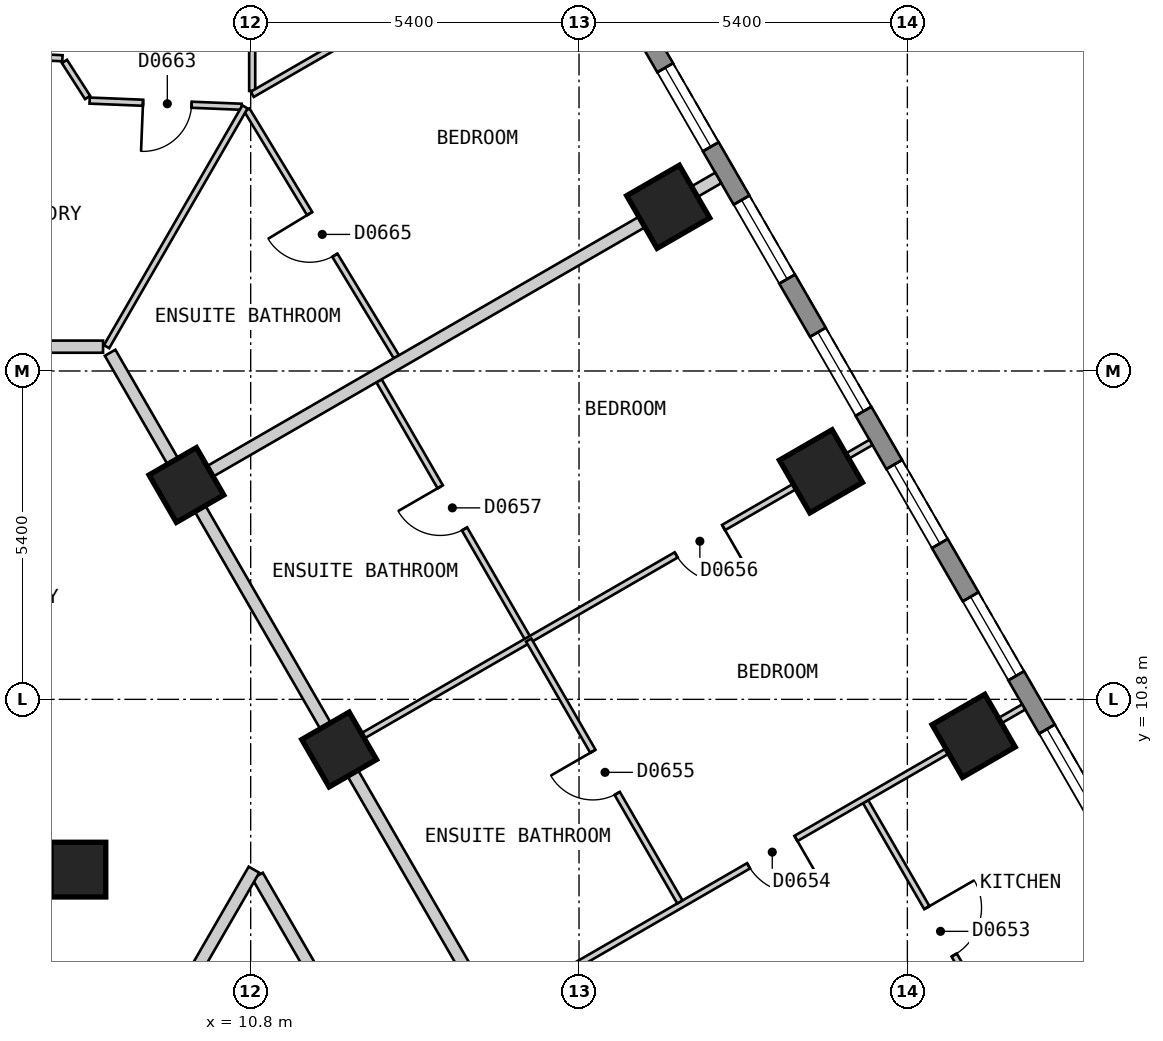
"""IFC4 building model, lengths in metres.
Left out: names, types, materials, properties, quantities, classifications, styles, units other than length and angle.
Written with IfcOpenShell. Run it as: python <this file> out.ifc"""

import sys

from ifc_helpers import new_model, si_unit, direction, frame, frame_2d, origin, origin_2d, place, context, subcontext, project, spatial, polyline, rectangle, outline, extrude, element, fill, save


model = new_model("IFC4")
c1 = context("Model", 3, precision=1e-05, world=origin(), true_north=direction((0.0, 1.0)))
c2 = subcontext(c1, "Body", "Model", "MODEL_VIEW")
j1 = project(units=[si_unit("LENGTHUNIT", "METRE"), si_unit("PLANEANGLEUNIT", "RADIAN")], contexts=[c1])
p1 = place(None, origin())
s1 = spatial("IfcSite", under=j1, at=p1, CompositionType="ELEMENT")
p2 = place(p1, origin())
s2 = spatial("IfcBuilding", under=s1, at=p2, CompositionType="ELEMENT")
p3 = place(p2, frame((0.0, 0.0, 81.0)))
s3 = spatial("IfcBuildingStorey", under=s2, at=p3, CompositionType="ELEMENT", Elevation=81.0)
for number, where, z_axis, x_axis in (
    (1, (22.69, 10.2, 0.0), (0.0, 0.0, 1.0), (-0.5, 0.866, 0.0)),
    (2, (20.179, 14.55, 0.0), (0.0, 0.0, 1.0), (-0.5, 0.866, 0.0)),
    (3, (17.667, 18.9, 0.0), (0.0, 0.0, 1.0), (-0.5, 0.866, 0.0)),
):
    element("IfcColumn", number, at=place(p3, frame(where, z_axis=z_axis, x_axis=x_axis)), inside=s3, PredefinedType="COLUMN", context=c2, shape_type="SweptSolid", body=[
        extrude(rectangle(XDim=1.0, YDim=1.0, at=origin_2d()), origin(), (0.0, 0.0, 1.0), 3.0),
    ])
for number, where, z_axis, x_axis in (
    (4, (12.255, 9.975, 0.0), (0.0, 0.0, 1.0), (-0.5, 0.866, 0.0)),
    (5, (7.967, 8.0, 0.0), (0.0, 0.0, 1.0), (1.0, 0.0, 0.0)),
    (6, (9.743, 14.325, 0.0), (0.0, 0.0, 1.0), (-0.5, 0.866, 0.0)),
):
    element("IfcColumn", number, at=place(p3, frame(where, z_axis=z_axis, x_axis=x_axis)), inside=s3, PredefinedType="COLUMN", context=c2, shape_type="SweptSolid", body=[
        extrude(rectangle(XDim=0.9, YDim=0.9, at=origin_2d()), origin(), (0.0, 0.0, 1.0), 3.0),
    ])
p4 = place(p3, frame((29.027, 1.425, 0.0), z_axis=(0.0, 0.0, 1.0), x_axis=(-0.500027479704, 0.866009537788, 0.0)))
e7 = element("IfcWall", 7, at=p4, inside=s3, PredefinedType="SOLIDWALL", context=c2, shape_type="SweptSolid", body=[
    extrude(outline(polyline([(0.0, -0.15), (26.559, -0.15), (26.478, 0.15), (0.08, 0.15), (0.0, -0.15)])), origin(), (0.0, 0.0, 1.0), 2.7),
])
p5 = place(p4, frame((1.227, 0.0, 0.15)))
e8 = element("IfcOpeningElement", 8, at=p5, cuts=e7, PredefinedType="OPENING", context=c2, shape_type="SweptSolid", body=[
    extrude(rectangle(XDim=1.5, YDim=2.1, at=frame_2d((0.75, 1.05))), frame((0.0, 0.16, 0.0), z_axis=(0.0, -1.0, 0.0), x_axis=(1.0, 0.0, 0.0)), (0.0, 0.0, 1.0), 0.32),
])
p6 = place(p4, frame((3.738, 0.0, 0.15)))
e9 = element("IfcOpeningElement", 9, at=p6, cuts=e7, PredefinedType="OPENING", context=c2, shape_type="SweptSolid", body=[
    extrude(rectangle(XDim=1.5, YDim=2.1, at=frame_2d((0.75, 1.05))), frame((0.0, 0.16, 0.0), z_axis=(0.0, -1.0, 0.0), x_axis=(1.0, 0.0, 0.0)), (0.0, 0.0, 1.0), 0.32),
])
p7 = place(p4, frame((6.25, 0.0, 0.15)))
e10 = element("IfcOpeningElement", 10, at=p7, cuts=e7, PredefinedType="OPENING", context=c2, shape_type="SweptSolid", body=[
    extrude(rectangle(XDim=1.5, YDim=2.1, at=frame_2d((0.75, 1.05))), frame((0.0, 0.16, 0.0), z_axis=(0.0, -1.0, 0.0), x_axis=(1.0, 0.0, 0.0)), (0.0, 0.0, 1.0), 0.32),
])
p8 = place(p4, frame((8.761, 0.0, 0.15)))
e11 = element("IfcOpeningElement", 11, at=p8, cuts=e7, PredefinedType="OPENING", context=c2, shape_type="SweptSolid", body=[
    extrude(rectangle(XDim=1.5, YDim=2.1, at=frame_2d((0.75, 1.05))), frame((0.0, 0.16, 0.0), z_axis=(0.0, -1.0, 0.0), x_axis=(1.0, 0.0, 0.0)), (0.0, 0.0, 1.0), 0.32),
])
p9 = place(p4, frame((11.273, 0.0, 0.15)))
e12 = element("IfcOpeningElement", 12, at=p9, cuts=e7, PredefinedType="OPENING", context=c2, shape_type="SweptSolid", body=[
    extrude(rectangle(XDim=1.5, YDim=2.1, at=frame_2d((0.75, 1.05))), frame((0.0, 0.16, 0.0), z_axis=(0.0, -1.0, 0.0), x_axis=(1.0, 0.0, 0.0)), (0.0, 0.0, 1.0), 0.32),
])
p10 = place(p4, frame((13.785, 0.0, 0.15)))
e13 = element("IfcOpeningElement", 13, at=p10, cuts=e7, PredefinedType="OPENING", context=c2, shape_type="SweptSolid", body=[
    extrude(rectangle(XDim=1.5, YDim=2.1, at=frame_2d((0.75, 1.05))), frame((0.0, 0.16, 0.0), z_axis=(0.0, -1.0, 0.0), x_axis=(1.0, 0.0, 0.0)), (0.0, 0.0, 1.0), 0.32),
])
p11 = place(p4, frame((16.296, 0.0, 0.15)))
e14 = element("IfcOpeningElement", 14, at=p11, cuts=e7, PredefinedType="OPENING", context=c2, shape_type="SweptSolid", body=[
    extrude(rectangle(XDim=1.5, YDim=2.1, at=frame_2d((0.75, 1.05))), frame((0.0, 0.16, 0.0), z_axis=(0.0, -1.0, 0.0), x_axis=(1.0, 0.0, 0.0)), (0.0, 0.0, 1.0), 0.32),
])
p12 = place(p4, frame((18.807, 0.0, 0.15)))
e15 = element("IfcOpeningElement", 15, at=p12, cuts=e7, PredefinedType="OPENING", context=c2, shape_type="SweptSolid", body=[
    extrude(rectangle(XDim=1.5, YDim=2.1, at=frame_2d((0.75, 1.05))), frame((0.0, 0.16, 0.0), z_axis=(0.0, -1.0, 0.0), x_axis=(1.0, 0.0, 0.0)), (0.0, 0.0, 1.0), 0.32),
])
p13 = place(p4, frame((21.319, 0.0, 0.15)))
e16 = element("IfcOpeningElement", 16, at=p13, cuts=e7, PredefinedType="OPENING", context=c2, shape_type="SweptSolid", body=[
    extrude(rectangle(XDim=1.5, YDim=2.1, at=frame_2d((0.75, 1.05))), frame((0.0, 0.16, 0.0), z_axis=(0.0, -1.0, 0.0), x_axis=(1.0, 0.0, 0.0)), (0.0, 0.0, 1.0), 0.32),
])
p14 = place(p4, frame((23.831, 0.0, 0.15)))
e17 = element("IfcOpeningElement", 17, at=p14, cuts=e7, PredefinedType="OPENING", context=c2, shape_type="SweptSolid", body=[
    extrude(rectangle(XDim=1.5, YDim=2.1, at=frame_2d((0.75, 1.05))), frame((0.0, 0.16, 0.0), z_axis=(0.0, -1.0, 0.0), x_axis=(1.0, 0.0, 0.0)), (0.0, 0.0, 1.0), 0.32),
])
p15 = place(p3, frame((10.913, 7.899, 0.0), z_axis=(0.0, 0.0, 1.0), x_axis=(0.500028940566, -0.866008694296, 0.0)))
e18 = element("IfcWall", 18, at=p15, inside=s3, PredefinedType="PARTITIONING", context=c2, shape_type="SweptSolid", body=[
    extrude(rectangle(XDim=10.159, YDim=0.2, at=frame_2d((5.08, 0.0))), origin(), (0.0, 0.0, 1.0), 2.7),
])
p16 = place(p15, frame((4.63, 0.0, 0.0)))
e19 = element("IfcOpeningElement", 19, at=p16, cuts=e18, PredefinedType="OPENING", context=c2, shape_type="SweptSolid", body=[
    extrude(rectangle(XDim=0.9, YDim=2.1, at=frame_2d((0.45, 1.05))), frame((0.0, 0.11, 0.0), z_axis=(0.0, -1.0, 0.0), x_axis=(1.0, 0.0, 0.0)), (0.0, 0.0, 1.0), 0.22),
])
p17 = place(p3, frame((8.488, 16.5, 0.0), z_axis=(0.0, 0.0, 1.0), x_axis=(0.499986836607, -0.86603300354, 0.0)))
e20 = element("IfcWall", 20, at=p17, inside=s3, PredefinedType="PARTITIONING", context=c2, shape_type="SweptSolid", body=[
    extrude(rectangle(XDim=20.09, YDim=0.2, at=frame_2d((10.045, 0.0))), origin(), (0.0, 0.0, 1.0), 2.7),
])
p18 = place(p17, frame((14.569, 0.0, 0.0)))
e21 = element("IfcOpeningElement", 21, at=p18, cuts=e20, PredefinedType="OPENING", context=c2, shape_type="SweptSolid", body=[
    extrude(rectangle(XDim=1.0, YDim=2.1, at=frame_2d((0.5, 1.05))), frame((0.0, 0.11, 0.0), z_axis=(0.0, -1.0, 0.0), x_axis=(1.0, 0.0, 0.0)), (0.0, 0.0, 1.0), 0.22),
])
p19 = place(p3, frame((5.889, 16.6, 0.0), z_axis=(0.0, 0.0, 1.0), x_axis=(1.0, 0.0, 0.0)))
e22 = element("IfcWall", 22, at=p19, inside=s3, PredefinedType="PARTITIONING", context=c2, shape_type="SweptSolid", body=[
    extrude(rectangle(XDim=2.483, YDim=0.2, at=frame_2d((1.242, 0.0))), origin(), (0.0, 0.0, 1.0), 2.7),
])
p20 = place(p3, frame((6.928, 1.2, 0.0), z_axis=(0.0, 0.0, 1.0), x_axis=(0.500055327065, 0.865993458332, 0.0)))
e23 = element("IfcWall", 23, at=p20, inside=s3, PredefinedType="PARTITIONING", context=c2, shape_type="SweptSolid", body=[
    extrude(rectangle(XDim=7.851, YDim=0.2, at=frame_2d((3.926, 0.0))), origin(), (0.0, 0.0, 1.0), 2.7),
])
p21 = place(p3, frame((7.737, 21.291, 0.0), z_axis=(0.0, 0.0, 1.0), x_axis=(0.540389876456, -0.841414749944, 0.0)))
e24 = element("IfcWall", 24, at=p21, inside=s3, PredefinedType="PARTITIONING", context=c2, shape_type="SweptSolid", body=[
    extrude(rectangle(XDim=0.705, YDim=0.1, at=frame_2d((0.353, 0.0))), origin(), (0.0, 0.0, 1.0), 2.7),
])
p22 = place(p3, frame((10.738, 20.492, 0.0), z_axis=(0.0, 0.0, 1.0), x_axis=(0.518100976056, -0.855319459974, 0.0)))
e25 = element("IfcWall", 25, at=p22, inside=s3, PredefinedType="PARTITIONING", context=c2, shape_type="SweptSolid", body=[
    extrude(rectangle(XDim=4.744, YDim=0.1, at=frame_2d((2.372, 0.0))), origin(), (0.0, 0.0, 1.0), 2.7),
])
p23 = place(p22, frame((1.992, 0.0, 0.0)))
e26 = element("IfcOpeningElement", 26, at=p23, cuts=e25, PredefinedType="OPENING", context=c2, shape_type="SweptSolid", body=[
    extrude(rectangle(XDim=0.8, YDim=2.1, at=frame_2d((0.4, 1.05))), frame((0.0, 0.06, 0.0), z_axis=(0.0, -1.0, 0.0), x_axis=(1.0, 0.0, 0.0)), (0.0, 0.0, 1.0), 0.12),
])
p24 = place(p3, frame((12.911, 16.038, 0.0), z_axis=(0.0, 0.0, 1.0), x_axis=(0.499974319101, -0.866040230151, 0.0)))
e27 = element("IfcWall", 27, at=p24, inside=s3, PredefinedType="PARTITIONING", context=c2, shape_type="SweptSolid", body=[
    extrude(rectangle(XDim=4.923, YDim=0.1, at=frame_2d((2.461, 0.0))), origin(), (0.0, 0.0, 1.0), 2.7),
])
p25 = place(p24, frame((2.012, 0.0, 0.0)))
e28 = element("IfcOpeningElement", 28, at=p25, cuts=e27, PredefinedType="OPENING", context=c2, shape_type="SweptSolid", body=[
    extrude(rectangle(XDim=0.8, YDim=2.1, at=frame_2d((0.4, 1.05))), frame((0.0, 0.06, 0.0), z_axis=(0.0, -1.0, 0.0), x_axis=(1.0, 0.0, 0.0)), (0.0, 0.0, 1.0), 0.12),
])
p26 = place(p3, frame((20.914, 9.117, 0.0), z_axis=(0.0, 0.0, 1.0), x_axis=(0.500007182864, -0.866021256716, 0.0)))
e29 = element("IfcWall", 29, at=p26, inside=s3, PredefinedType="PARTITIONING", context=c2, shape_type="SweptSolid", body=[
    extrude(rectangle(XDim=4.874, YDim=0.1, at=frame_2d((2.437, 0.0))), origin(), (0.0, 0.0, 1.0), 2.7),
])
p27 = place(p26, frame((2.012, 0.0, 0.0)))
e30 = element("IfcOpeningElement", 30, at=p27, cuts=e29, PredefinedType="OPENING", context=c2, shape_type="SweptSolid", body=[
    extrude(rectangle(XDim=0.9, YDim=2.1, at=frame_2d((0.45, 1.05))), frame((0.0, 0.06, 0.0), z_axis=(0.0, -1.0, 0.0), x_axis=(1.0, 0.0, 0.0)), (0.0, 0.0, 1.0), 0.12),
])
p28 = place(p3, frame((8.151, 20.647, 0.0), z_axis=(0.0, 0.0, 1.0), x_axis=(0.999167241152, -0.040802257405, 0.0)))
e31 = element("IfcWall", 31, at=p28, inside=s3, PredefinedType="PARTITIONING", context=c2, shape_type="SweptSolid", body=[
    extrude(rectangle(XDim=2.501, YDim=0.1, at=frame_2d((1.25, 0.0))), origin(), (0.0, 0.0, 1.0), 2.7),
])
p29 = place(p28, frame((0.879, 0.0, 0.0)))
e32 = element("IfcOpeningElement", 32, at=p29, cuts=e31, PredefinedType="OPENING", context=c2, shape_type="SweptSolid", body=[
    extrude(rectangle(XDim=0.8, YDim=2.1, at=frame_2d((0.4, 1.05))), frame((0.0, 0.06, 0.0), z_axis=(0.0, -1.0, 0.0), x_axis=(1.0, 0.0, 0.0)), (0.0, 0.0, 1.0), 0.12),
])
p30 = place(p3, frame((5.649, 21.441, 0.0), z_axis=(0.0, 0.0, 1.0), x_axis=(0.998867332207, -0.047582062273, 0.0)))
e33 = element("IfcWall", 33, at=p30, inside=s3, PredefinedType="PARTITIONING", context=c2, shape_type="SweptSolid", body=[
    extrude(rectangle(XDim=2.058, YDim=0.1, at=frame_2d((1.029, 0.0))), origin(), (0.0, 0.0, 1.0), 2.7),
])
p31 = place(p3, frame((8.43, 16.6, 0.0), z_axis=(0.0, 0.0, 1.0), x_axis=(0.499951460778, 0.866053426104, 0.0)))
e34 = element("IfcWall", 34, at=p31, inside=s3, PredefinedType="PARTITIONING", context=c2, shape_type="SweptSolid", body=[
    extrude(rectangle(XDim=4.553, YDim=0.1, at=frame_2d((2.276, 0.0))), origin(), (0.0, 0.0, 1.0), 2.7),
])
p32 = place(p3, frame((10.825, 20.806, 0.0), z_axis=(0.0, 0.0, 1.0), x_axis=(0.0, 1.0, 0.0)))
e35 = element("IfcWall", 35, at=p32, inside=s3, PredefinedType="PARTITIONING", context=c2, shape_type="SweptSolid", body=[
    extrude(rectangle(XDim=5.894, YDim=0.1, at=frame_2d((2.947, 0.0))), origin(), (0.0, 0.0, 1.0), 2.7),
])
p33 = place(p32, frame((2.468, 0.0, 0.0)))
e36 = element("IfcOpeningElement", 36, at=p33, cuts=e35, PredefinedType="OPENING", context=c2, shape_type="SweptSolid", body=[
    extrude(rectangle(XDim=0.9, YDim=2.1, at=frame_2d((0.45, 1.05))), frame((0.0, 0.06, 0.0), z_axis=(0.0, -1.0, 0.0), x_axis=(1.0, 0.0, 0.0)), (0.0, 0.0, 1.0), 0.12),
])
p34 = place(p3, frame((14.853, 5.675, 0.0), z_axis=(0.0, 0.0, 1.0), x_axis=(0.866016855193, 0.500014806302, 0.0)))
e37 = element("IfcWall", 37, at=p34, inside=s3, PredefinedType="PARTITIONING", context=c2, shape_type="SweptSolid", body=[
    extrude(rectangle(XDim=10.0, YDim=0.1, at=frame_2d((5.0, 0.0))), origin(), (0.0, 0.0, 1.0), 2.7),
])
p35 = place(p34, frame((4.775, 0.0, 0.0)))
e38 = element("IfcOpeningElement", 38, at=p35, cuts=e37, PredefinedType="OPENING", context=c2, shape_type="SweptSolid", body=[
    extrude(rectangle(XDim=0.9, YDim=2.1, at=frame_2d((0.45, 1.05))), frame((0.0, 0.06, 0.0), z_axis=(0.0, -1.0, 0.0), x_axis=(1.0, 0.0, 0.0)), (0.0, 0.0, 1.0), 0.12),
])
p36 = place(p3, frame((10.826, 20.75, 0.0), z_axis=(0.0, 0.0, 1.0), x_axis=(0.865986712877, 0.50006700863, 0.0)))
e39 = element("IfcWall", 39, at=p36, inside=s3, PredefinedType="PARTITIONING", context=c2, shape_type="SweptSolid", body=[
    extrude(rectangle(XDim=5.949, YDim=0.1, at=frame_2d((2.975, 0.0))), origin(), (0.0, 0.0, 1.0), 2.7),
])
p37 = place(p36, frame((2.524, 0.0, 0.0)))
e40 = element("IfcOpeningElement", 40, at=p37, cuts=e39, PredefinedType="OPENING", context=c2, shape_type="SweptSolid", body=[
    extrude(rectangle(XDim=0.9, YDim=2.1, at=frame_2d((0.45, 1.05))), frame((0.0, 0.06, 0.0), z_axis=(0.0, -1.0, 0.0), x_axis=(1.0, 0.0, 0.0)), (0.0, 0.0, 1.0), 0.12),
])
p38 = place(p3, frame((12.342, 10.025, 0.0), z_axis=(0.0, 0.0, 1.0), x_axis=(0.865992435864, 0.500057097767, 0.0)))
e41 = element("IfcWall", 41, at=p38, inside=s3, PredefinedType="PARTITIONING", context=c2, shape_type="SweptSolid", body=[
    extrude(rectangle(XDim=9.999, YDim=0.1, at=frame_2d((5.0, 0.0))), origin(), (0.0, 0.0, 1.0), 2.7),
])
p39 = place(p38, frame((6.3, 0.0, 0.0)))
e42 = element("IfcOpeningElement", 42, at=p39, cuts=e41, PredefinedType="OPENING", context=c2, shape_type="SweptSolid", body=[
    extrude(rectangle(XDim=0.9, YDim=2.1, at=frame_2d((0.45, 1.05))), frame((0.0, 0.06, 0.0), z_axis=(0.0, -1.0, 0.0), x_axis=(1.0, 0.0, 0.0)), (0.0, 0.0, 1.0), 0.12),
])
p40 = place(p3, frame((9.83, 14.375, 0.0), z_axis=(0.0, 0.0, 1.0), x_axis=(0.866016855193, 0.500014806302, 0.0)))
e43 = element("IfcWall", 43, at=p40, inside=s3, PredefinedType="PARTITIONING", context=c2, shape_type="SweptSolid", body=[
    extrude(rectangle(XDim=10.0, YDim=0.2, at=frame_2d((5.0, 0.0))), origin(), (0.0, 0.0, 1.0), 2.7),
])
p41 = place(p3, frame((15.372, 11.775, 0.0), z_axis=(0.0, 0.0, 1.0), x_axis=(0.500035488351, -0.866004913606, 0.0)))
e44 = element("IfcWall", 44, at=p41, inside=s3, PredefinedType="PARTITIONING", context=c2, shape_type="SweptSolid", body=[
    extrude(rectangle(XDim=4.973, YDim=0.1, at=frame_2d((2.487, 0.0))), origin(), (0.0, 0.0, 1.0), 2.7),
])
p42 = place(p41, frame((2.112, 0.0, 0.0)))
e45 = element("IfcOpeningElement", 45, at=p42, cuts=e44, PredefinedType="OPENING", context=c2, shape_type="SweptSolid", body=[
    extrude(rectangle(XDim=0.8, YDim=2.1, at=frame_2d((0.4, 1.05))), frame((0.0, 0.06, 0.0), z_axis=(0.0, -1.0, 0.0), x_axis=(1.0, 0.0, 0.0)), (0.0, 0.0, 1.0), 0.12),
])
p43 = place(p8, origin())
e46 = element("IfcWindow", 46, at=p43, inside=s3, PartitioningType="SINGLE_PANEL", PredefinedType="WINDOW", context=c2, shape_type="SweptSolid", body=[
    extrude(rectangle(XDim=1.5, YDim=2.1, at=frame_2d((0.75, 1.05))), frame((0.0, 0.03, 0.0), z_axis=(0.0, -1.0, 0.0), x_axis=(1.0, 0.0, 0.0)), (0.0, 0.0, 1.0), 0.06),
])
fill(e11, e46)
p44 = place(p9, origin())
e47 = element("IfcWindow", 47, at=p44, inside=s3, PartitioningType="SINGLE_PANEL", PredefinedType="WINDOW", context=c2, shape_type="SweptSolid", body=[
    extrude(rectangle(XDim=1.5, YDim=2.1, at=frame_2d((0.75, 1.05))), frame((0.0, 0.03, 0.0), z_axis=(0.0, -1.0, 0.0), x_axis=(1.0, 0.0, 0.0)), (0.0, 0.0, 1.0), 0.06),
])
fill(e12, e47)
p45 = place(p10, origin())
e48 = element("IfcWindow", 48, at=p45, inside=s3, PartitioningType="SINGLE_PANEL", PredefinedType="WINDOW", context=c2, shape_type="SweptSolid", body=[
    extrude(rectangle(XDim=1.5, YDim=2.1, at=frame_2d((0.75, 1.05))), frame((0.0, 0.03, 0.0), z_axis=(0.0, -1.0, 0.0), x_axis=(1.0, 0.0, 0.0)), (0.0, 0.0, 1.0), 0.06),
])
fill(e13, e48)
p46 = place(p11, origin())
e49 = element("IfcWindow", 49, at=p46, inside=s3, PartitioningType="SINGLE_PANEL", PredefinedType="WINDOW", context=c2, shape_type="SweptSolid", body=[
    extrude(rectangle(XDim=1.5, YDim=2.1, at=frame_2d((0.75, 1.05))), frame((0.0, 0.03, 0.0), z_axis=(0.0, -1.0, 0.0), x_axis=(1.0, 0.0, 0.0)), (0.0, 0.0, 1.0), 0.06),
])
fill(e14, e49)
p47 = place(p12, origin())
e50 = element("IfcWindow", 50, at=p47, inside=s3, PartitioningType="SINGLE_PANEL", PredefinedType="WINDOW", context=c2, shape_type="SweptSolid", body=[
    extrude(rectangle(XDim=1.5, YDim=2.1, at=frame_2d((0.75, 1.05))), frame((0.0, 0.03, 0.0), z_axis=(0.0, -1.0, 0.0), x_axis=(1.0, 0.0, 0.0)), (0.0, 0.0, 1.0), 0.06),
])
fill(e15, e50)
p48 = place(p13, origin())
e51 = element("IfcWindow", 51, at=p48, inside=s3, PartitioningType="SINGLE_PANEL", PredefinedType="WINDOW", context=c2, shape_type="SweptSolid", body=[
    extrude(rectangle(XDim=1.5, YDim=2.1, at=frame_2d((0.75, 1.05))), frame((0.0, 0.03, 0.0), z_axis=(0.0, -1.0, 0.0), x_axis=(1.0, 0.0, 0.0)), (0.0, 0.0, 1.0), 0.06),
])
fill(e16, e51)
p49 = place(p27, origin())
e52 = element("IfcDoor", 52, at=p49, inside=s3, OperationType="SINGLE_SWING_LEFT", PredefinedType="DOOR", context=c2, shape_type="SweptSolid", body=[
    extrude(rectangle(XDim=0.9, YDim=2.1, at=frame_2d((0.45, 1.05))), frame((0.0, 0.025, 0.0), z_axis=(0.0, -1.0, 0.0), x_axis=(1.0, 0.0, 0.0)), (0.0, 0.0, 1.0), 0.05),
])
fill(e30, e52)
p50 = place(p35, origin())
e53 = element("IfcDoor", 53, at=p50, inside=s3, OperationType="SINGLE_SWING_RIGHT", PredefinedType="DOOR", context=c2, shape_type="SweptSolid", body=[
    extrude(rectangle(XDim=0.9, YDim=2.1, at=frame_2d((0.45, 1.05))), frame((0.0, 0.025, 0.0), z_axis=(0.0, -1.0, 0.0), x_axis=(1.0, 0.0, 0.0)), (0.0, 0.0, 1.0), 0.05),
])
fill(e38, e53)
p51 = place(p42, origin())
e54 = element("IfcDoor", 54, at=p51, inside=s3, OperationType="SINGLE_SWING_LEFT", PredefinedType="DOOR", context=c2, shape_type="SweptSolid", body=[
    extrude(rectangle(XDim=0.8, YDim=2.1, at=frame_2d((0.4, 1.05))), frame((0.0, 0.025, 0.0), z_axis=(0.0, -1.0, 0.0), x_axis=(1.0, 0.0, 0.0)), (0.0, 0.0, 1.0), 0.05),
])
fill(e45, e54)
p52 = place(p39, origin())
e55 = element("IfcDoor", 55, at=p52, inside=s3, OperationType="SINGLE_SWING_RIGHT", PredefinedType="DOOR", context=c2, shape_type="SweptSolid", body=[
    extrude(rectangle(XDim=0.9, YDim=2.1, at=frame_2d((0.45, 1.05))), frame((0.0, 0.025, 0.0), z_axis=(0.0, -1.0, 0.0), x_axis=(1.0, 0.0, 0.0)), (0.0, 0.0, 1.0), 0.05),
])
fill(e42, e55)
p53 = place(p25, origin())
e56 = element("IfcDoor", 56, at=p53, inside=s3, OperationType="SINGLE_SWING_LEFT", PredefinedType="DOOR", context=c2, shape_type="SweptSolid", body=[
    extrude(rectangle(XDim=0.8, YDim=2.1, at=frame_2d((0.4, 1.05))), frame((0.0, 0.025, 0.0), z_axis=(0.0, -1.0, 0.0), x_axis=(1.0, 0.0, 0.0)), (0.0, 0.0, 1.0), 0.05),
])
fill(e28, e56)
p54 = place(p29, origin())
e57 = element("IfcDoor", 57, at=p54, inside=s3, OperationType="SINGLE_SWING_LEFT", PredefinedType="DOOR", context=c2, shape_type="SweptSolid", body=[
    extrude(rectangle(XDim=0.8, YDim=2.1, at=frame_2d((0.4, 1.05))), frame((0.0, 0.025, 0.0), z_axis=(0.0, -1.0, 0.0), x_axis=(1.0, 0.0, 0.0)), (0.0, 0.0, 1.0), 0.05),
])
fill(e32, e57)
p55 = place(p23, origin())
e58 = element("IfcDoor", 58, at=p55, inside=s3, OperationType="SINGLE_SWING_LEFT", PredefinedType="DOOR", context=c2, shape_type="SweptSolid", body=[
    extrude(rectangle(XDim=0.8, YDim=2.1, at=frame_2d((0.4, 1.05))), frame((0.0, 0.025, 0.0), z_axis=(0.0, -1.0, 0.0), x_axis=(1.0, 0.0, 0.0)), (0.0, 0.0, 1.0), 0.05),
])
fill(e26, e58)
save(model, sys.argv[1])
